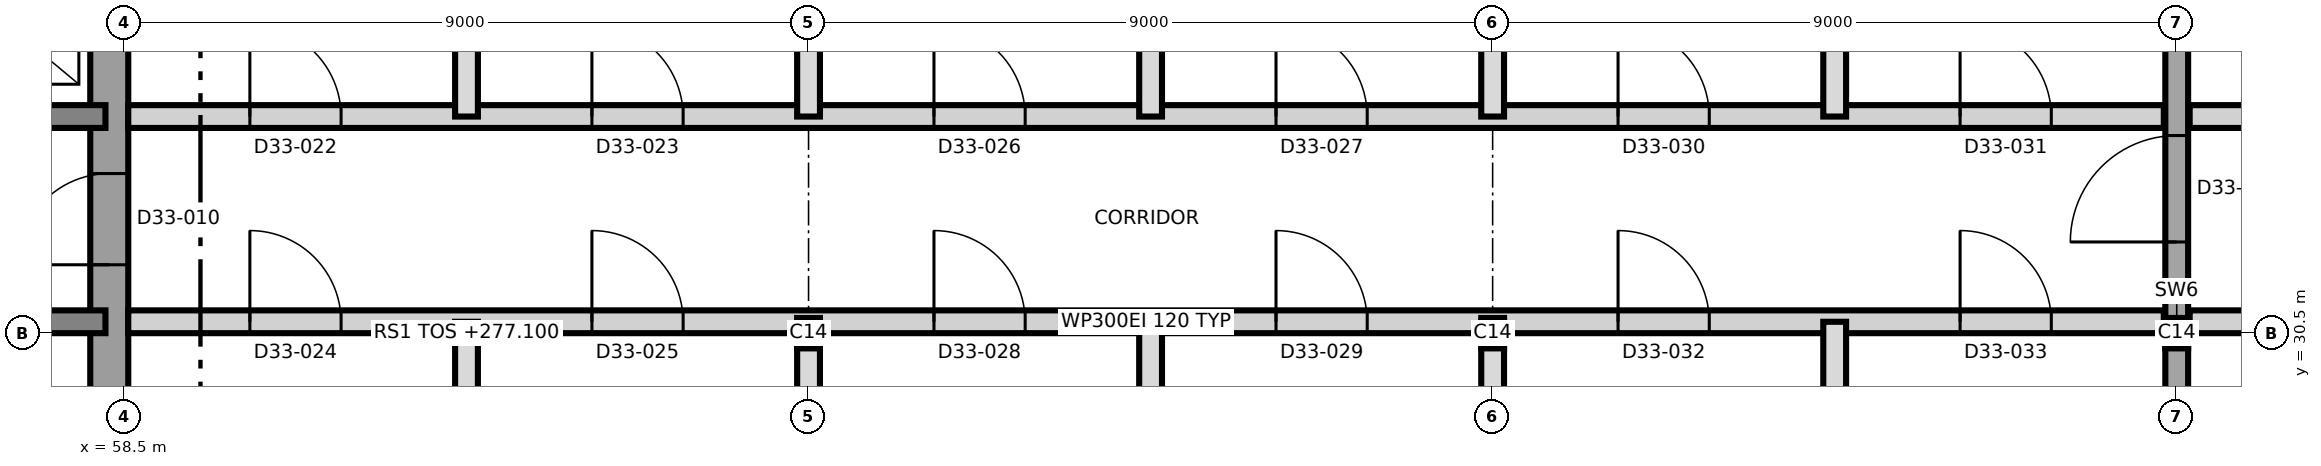
"""IFC4 building model, lengths in metres.
Left out: names, types, materials, properties, quantities, classifications, styles, units other than length and angle.
Written with IfcOpenShell. Run it as: python <this file> out.ifc"""

import sys

from ifc_helpers import new_model, si_unit, direction, frame, frame_2d, origin, origin_2d, place, context, subcontext, project, spatial, rectangle, i_section, extrude, element, fill, save


model = new_model("IFC4")
c1 = context("Model", 3, precision=1e-05, world=origin(), true_north=direction((0.0, 1.0)))
c2 = subcontext(c1, "Body", "Model", "MODEL_VIEW")
j1 = project(units=[si_unit("LENGTHUNIT", "METRE"), si_unit("PLANEANGLEUNIT", "RADIAN")], contexts=[c1])
p1 = place(None, origin())
s1 = spatial("IfcSite", under=j1, at=p1, CompositionType="ELEMENT")
p2 = place(p1, origin())
s2 = spatial("IfcBuilding", under=s1, at=p2, CompositionType="ELEMENT")
p3 = place(p2, frame((0.0, 0.0, 277.1)))
s3 = spatial("IfcBuildingStorey", under=s2, at=p3, CompositionType="ELEMENT", Elevation=277.1)
p4 = place(p3, frame((58.3, 21.25, 0.0), z_axis=(0.0, 0.0, 1.0), x_axis=(0.0, 1.0, 0.0)))
e1 = element("IfcWall", 1, at=p4, inside=s3, PredefinedType="SHEAR", context=c2, shape_type="SweptSolid", body=[
    extrude(rectangle(XDim=18.5, YDim=0.5, at=frame_2d((9.25, 0.0))), origin(), (0.0, 0.0, 1.0), 4.2),
])
p5 = place(p4, frame((10.15, 0.0, 0.0)))
e2 = element("IfcOpeningElement", 2, at=p5, cuts=e1, PredefinedType="OPENING", context=c2, shape_type="SweptSolid", body=[
    extrude(rectangle(XDim=1.2, YDim=2.1, at=frame_2d((0.6, 1.05))), frame((0.0, 0.26, 0.0), z_axis=(0.0, -1.0, 0.0), x_axis=(1.0, 0.0, 0.0)), (0.0, 0.0, 1.0), 0.52),
])
p6 = place(p3, frame((31.75, 30.65, 0.0), z_axis=(0.0, 0.0, 1.0), x_axis=(1.0, 0.0, 0.0)))
e3 = element("IfcWall", 3, at=p6, inside=s3, PredefinedType="SHEAR", context=c2, shape_type="SweptSolid", body=[
    extrude(rectangle(XDim=26.5, YDim=0.3, at=frame_2d((13.25, 0.0))), origin(), (0.0, 0.0, 1.0), 4.2),
])
p7 = place(p6, frame((24.75, 0.0, 0.0)))
e4 = element("IfcOpeningElement", 4, at=p7, cuts=e3, PredefinedType="OPENING", context=c2, shape_type="SweptSolid", body=[
    extrude(rectangle(XDim=1.0, YDim=2.1, at=frame_2d((0.5, 1.05))), frame((0.0, 0.16, 0.0), z_axis=(0.0, -1.0, 0.0), x_axis=(1.0, 0.0, 0.0)), (0.0, 0.0, 1.0), 0.32),
])
p8 = place(p6, frame((11.55, 0.0, 0.0)))
e5 = element("IfcOpeningElement", 5, at=p8, cuts=e3, PredefinedType="OPENING", context=c2, shape_type="SweptSolid", body=[
    extrude(rectangle(XDim=1.0, YDim=2.1, at=frame_2d((0.5, 1.05))), frame((0.0, 0.16, 0.0), z_axis=(0.0, -1.0, 0.0), x_axis=(1.0, 0.0, 0.0)), (0.0, 0.0, 1.0), 0.32),
])
p9 = place(p3, frame((31.75, 33.35, 0.0), z_axis=(0.0, 0.0, 1.0), x_axis=(1.0, 0.0, 0.0)))
e6 = element("IfcWall", 6, at=p9, inside=s3, PredefinedType="SHEAR", context=c2, shape_type="SweptSolid", body=[
    extrude(rectangle(XDim=26.5, YDim=0.3, at=frame_2d((13.25, 0.0))), origin(), (0.0, 0.0, 1.0), 4.2),
])
p10 = place(p9, frame((13.9, 0.0, 0.0)))
e7 = element("IfcOpeningElement", 7, at=p10, cuts=e6, PredefinedType="OPENING", context=c2, shape_type="SweptSolid", body=[
    extrude(rectangle(XDim=1.4, YDim=2.1, at=frame_2d((0.7, 1.05))), frame((0.0, 0.16, 0.0), z_axis=(0.0, -1.0, 0.0), x_axis=(1.0, 0.0, 0.0)), (0.0, 0.0, 1.0), 0.32),
])
p11 = place(p9, frame((5.375, 0.0, 0.0)))
e8 = element("IfcOpeningElement", 8, at=p11, cuts=e6, PredefinedType="OPENING", context=c2, shape_type="SweptSolid", body=[
    extrude(rectangle(XDim=1.2, YDim=2.1, at=frame_2d((0.6, 1.05))), frame((0.0, 0.16, 0.0), z_axis=(0.0, -1.0, 0.0), x_axis=(1.0, 0.0, 0.0)), (0.0, 0.0, 1.0), 0.32),
])
p12 = place(p9, frame((19.925, 0.0, 0.0)))
e9 = element("IfcOpeningElement", 9, at=p12, cuts=e6, PredefinedType="OPENING", context=c2, shape_type="SweptSolid", body=[
    extrude(rectangle(XDim=1.2, YDim=2.1, at=frame_2d((0.6, 1.05))), frame((0.0, 0.16, 0.0), z_axis=(0.0, -1.0, 0.0), x_axis=(1.0, 0.0, 0.0)), (0.0, 0.0, 1.0), 0.32),
])
p13 = place(p9, frame((9.8, 0.0, 0.0)))
e10 = element("IfcOpeningElement", 10, at=p13, cuts=e6, PredefinedType="OPENING", context=c2, shape_type="SweptSolid", body=[
    extrude(rectangle(XDim=0.9, YDim=2.1, at=frame_2d((0.45, 1.05))), frame((0.0, 0.16, 0.0), z_axis=(0.0, -1.0, 0.0), x_axis=(1.0, 0.0, 0.0)), (0.0, 0.0, 1.0), 0.32),
])
p14 = place(p3, frame((85.5, 20.35, 0.0), z_axis=(0.0, 0.0, 1.0), x_axis=(0.0, 1.0, 0.0)))
e11 = element("IfcWall", 11, at=p14, inside=s3, PredefinedType="SHEAR", context=c2, shape_type="SweptSolid", body=[
    extrude(rectangle(XDim=20.3, YDim=0.3, at=frame_2d((10.15, 0.0))), origin(), (0.0, 0.0, 1.0), 4.2),
])
p15 = place(p14, frame((11.35, 0.0, 0.0)))
e12 = element("IfcOpeningElement", 12, at=p15, cuts=e11, PredefinedType="OPENING", context=c2, shape_type="SweptSolid", body=[
    extrude(rectangle(XDim=1.4, YDim=2.1, at=frame_2d((0.7, 1.05))), frame((0.0, 0.16, 0.0), z_axis=(0.0, -1.0, 0.0), x_axis=(1.0, 0.0, 0.0)), (0.0, 0.0, 1.0), 0.32),
])
for number, where, z_axis, x_axis in (
    (13, (67.5, 30.5, 0.0), (0.0, 0.0, 1.0), (1.0, 0.0, 0.0)),
    (14, (76.5, 30.5, 0.0), (0.0, 0.0, 1.0), (1.0, 0.0, 0.0)),
    (15, (85.5, 30.5, 0.0), (0.0, 0.0, 1.0), (1.0, 0.0, 0.0)),
):
    element("IfcColumn", number, at=place(p3, frame(where, z_axis=z_axis, x_axis=x_axis)), inside=s3, PredefinedType="COLUMN", context=c2, shape_type="SweptSolid", body=[
        extrude(i_section(OverallWidth=0.3, OverallDepth=0.4, WebThickness=0.013, FlangeThickness=0.024, FilletRadius=0.027, at=origin_2d()), origin(), (0.0, 0.0, 1.0), 4.2),
    ])
p16 = place(p3, frame((58.55, 30.65, 0.0), z_axis=(0.0, 0.0, 1.0), x_axis=(1.0, 0.0, 0.0)))
e16 = element("IfcWall", 16, at=p16, inside=s3, PredefinedType="PARTITIONING", context=c2, shape_type="SweptSolid", body=[
    extrude(rectangle(XDim=26.78, YDim=0.3, at=frame_2d((13.39, 0.0))), origin(), (0.0, 0.0, 1.0), 3.9),
])
p17 = place(p16, frame((1.6, 0.0, 0.0)))
e17 = element("IfcOpeningElement", 17, at=p17, cuts=e16, PredefinedType="OPENING", context=c2, shape_type="SweptSolid", body=[
    extrude(rectangle(XDim=1.2, YDim=2.1, at=frame_2d((0.6, 1.05))), frame((0.0, 0.16, 0.0), z_axis=(0.0, -1.0, 0.0), x_axis=(1.0, 0.0, 0.0)), (0.0, 0.0, 1.0), 0.32),
])
p18 = place(p16, frame((6.1, 0.0, 0.0)))
e18 = element("IfcOpeningElement", 18, at=p18, cuts=e16, PredefinedType="OPENING", context=c2, shape_type="SweptSolid", body=[
    extrude(rectangle(XDim=1.2, YDim=2.1, at=frame_2d((0.6, 1.05))), frame((0.0, 0.16, 0.0), z_axis=(0.0, -1.0, 0.0), x_axis=(1.0, 0.0, 0.0)), (0.0, 0.0, 1.0), 0.32),
])
p19 = place(p16, frame((10.6, 0.0, 0.0)))
e19 = element("IfcOpeningElement", 19, at=p19, cuts=e16, PredefinedType="OPENING", context=c2, shape_type="SweptSolid", body=[
    extrude(rectangle(XDim=1.2, YDim=2.1, at=frame_2d((0.6, 1.05))), frame((0.0, 0.16, 0.0), z_axis=(0.0, -1.0, 0.0), x_axis=(1.0, 0.0, 0.0)), (0.0, 0.0, 1.0), 0.32),
])
p20 = place(p16, frame((15.1, 0.0, 0.0)))
e20 = element("IfcOpeningElement", 20, at=p20, cuts=e16, PredefinedType="OPENING", context=c2, shape_type="SweptSolid", body=[
    extrude(rectangle(XDim=1.2, YDim=2.1, at=frame_2d((0.6, 1.05))), frame((0.0, 0.16, 0.0), z_axis=(0.0, -1.0, 0.0), x_axis=(1.0, 0.0, 0.0)), (0.0, 0.0, 1.0), 0.32),
])
p21 = place(p16, frame((19.6, 0.0, 0.0)))
e21 = element("IfcOpeningElement", 21, at=p21, cuts=e16, PredefinedType="OPENING", context=c2, shape_type="SweptSolid", body=[
    extrude(rectangle(XDim=1.2, YDim=2.1, at=frame_2d((0.6, 1.05))), frame((0.0, 0.16, 0.0), z_axis=(0.0, -1.0, 0.0), x_axis=(1.0, 0.0, 0.0)), (0.0, 0.0, 1.0), 0.32),
])
p22 = place(p16, frame((24.1, 0.0, 0.0)))
e22 = element("IfcOpeningElement", 22, at=p22, cuts=e16, PredefinedType="OPENING", context=c2, shape_type="SweptSolid", body=[
    extrude(rectangle(XDim=1.2, YDim=2.1, at=frame_2d((0.6, 1.05))), frame((0.0, 0.16, 0.0), z_axis=(0.0, -1.0, 0.0), x_axis=(1.0, 0.0, 0.0)), (0.0, 0.0, 1.0), 0.32),
])
p23 = place(p3, frame((85.67, 30.65, 0.0), z_axis=(0.0, 0.0, 1.0), x_axis=(1.0, 0.0, 0.0)))
e23 = element("IfcWall", 23, at=p23, inside=s3, PredefinedType="PARTITIONING", context=c2, shape_type="SweptSolid", body=[
    extrude(rectangle(XDim=9.58, YDim=0.3, at=frame_2d((4.79, 0.0))), origin(), (0.0, 0.0, 1.0), 3.9),
])
p24 = place(p23, frame((2.23, 0.0, 0.0)))
e24 = element("IfcOpeningElement", 24, at=p24, cuts=e23, PredefinedType="OPENING", context=c2, shape_type="SweptSolid", body=[
    extrude(rectangle(XDim=0.9, YDim=2.1, at=frame_2d((0.45, 1.05))), frame((0.0, 0.16, 0.0), z_axis=(0.0, -1.0, 0.0), x_axis=(1.0, 0.0, 0.0)), (0.0, 0.0, 1.0), 0.32),
])
p25 = place(p23, frame((5.63, 0.0, 0.0)))
e25 = element("IfcOpeningElement", 25, at=p25, cuts=e23, PredefinedType="OPENING", context=c2, shape_type="SweptSolid", body=[
    extrude(rectangle(XDim=1.0, YDim=2.1, at=frame_2d((0.5, 1.05))), frame((0.0, 0.16, 0.0), z_axis=(0.0, -1.0, 0.0), x_axis=(1.0, 0.0, 0.0)), (0.0, 0.0, 1.0), 0.32),
])
p26 = place(p3, frame((58.55, 33.35, 0.0), z_axis=(0.0, 0.0, 1.0), x_axis=(1.0, 0.0, 0.0)))
e26 = element("IfcWall", 26, at=p26, inside=s3, PredefinedType="PARTITIONING", context=c2, shape_type="SweptSolid", body=[
    extrude(rectangle(XDim=26.78, YDim=0.3, at=frame_2d((13.39, 0.0))), origin(), (0.0, 0.0, 1.0), 3.9),
])
p27 = place(p26, frame((1.6, 0.0, 0.0)))
e27 = element("IfcOpeningElement", 27, at=p27, cuts=e26, PredefinedType="OPENING", context=c2, shape_type="SweptSolid", body=[
    extrude(rectangle(XDim=1.2, YDim=2.1, at=frame_2d((0.6, 1.05))), frame((0.0, 0.16, 0.0), z_axis=(0.0, -1.0, 0.0), x_axis=(1.0, 0.0, 0.0)), (0.0, 0.0, 1.0), 0.32),
])
p28 = place(p26, frame((6.1, 0.0, 0.0)))
e28 = element("IfcOpeningElement", 28, at=p28, cuts=e26, PredefinedType="OPENING", context=c2, shape_type="SweptSolid", body=[
    extrude(rectangle(XDim=1.2, YDim=2.1, at=frame_2d((0.6, 1.05))), frame((0.0, 0.16, 0.0), z_axis=(0.0, -1.0, 0.0), x_axis=(1.0, 0.0, 0.0)), (0.0, 0.0, 1.0), 0.32),
])
p29 = place(p26, frame((10.6, 0.0, 0.0)))
e29 = element("IfcOpeningElement", 29, at=p29, cuts=e26, PredefinedType="OPENING", context=c2, shape_type="SweptSolid", body=[
    extrude(rectangle(XDim=1.2, YDim=2.1, at=frame_2d((0.6, 1.05))), frame((0.0, 0.16, 0.0), z_axis=(0.0, -1.0, 0.0), x_axis=(1.0, 0.0, 0.0)), (0.0, 0.0, 1.0), 0.32),
])
p30 = place(p26, frame((15.1, 0.0, 0.0)))
e30 = element("IfcOpeningElement", 30, at=p30, cuts=e26, PredefinedType="OPENING", context=c2, shape_type="SweptSolid", body=[
    extrude(rectangle(XDim=1.2, YDim=2.1, at=frame_2d((0.6, 1.05))), frame((0.0, 0.16, 0.0), z_axis=(0.0, -1.0, 0.0), x_axis=(1.0, 0.0, 0.0)), (0.0, 0.0, 1.0), 0.32),
])
p31 = place(p26, frame((19.6, 0.0, 0.0)))
e31 = element("IfcOpeningElement", 31, at=p31, cuts=e26, PredefinedType="OPENING", context=c2, shape_type="SweptSolid", body=[
    extrude(rectangle(XDim=1.2, YDim=2.1, at=frame_2d((0.6, 1.05))), frame((0.0, 0.16, 0.0), z_axis=(0.0, -1.0, 0.0), x_axis=(1.0, 0.0, 0.0)), (0.0, 0.0, 1.0), 0.32),
])
p32 = place(p26, frame((24.1, 0.0, 0.0)))
e32 = element("IfcOpeningElement", 32, at=p32, cuts=e26, PredefinedType="OPENING", context=c2, shape_type="SweptSolid", body=[
    extrude(rectangle(XDim=1.2, YDim=2.1, at=frame_2d((0.6, 1.05))), frame((0.0, 0.16, 0.0), z_axis=(0.0, -1.0, 0.0), x_axis=(1.0, 0.0, 0.0)), (0.0, 0.0, 1.0), 0.32),
])
p33 = place(p3, frame((85.67, 33.35, 0.0), z_axis=(0.0, 0.0, 1.0), x_axis=(1.0, 0.0, 0.0)))
e33 = element("IfcWall", 33, at=p33, inside=s3, PredefinedType="PARTITIONING", context=c2, shape_type="SweptSolid", body=[
    extrude(rectangle(XDim=9.58, YDim=0.3, at=frame_2d((4.79, 0.0))), origin(), (0.0, 0.0, 1.0), 3.9),
])
p34 = place(p33, frame((1.83, 0.0, 0.0)))
e34 = element("IfcOpeningElement", 34, at=p34, cuts=e33, PredefinedType="OPENING", context=c2, shape_type="SweptSolid", body=[
    extrude(rectangle(XDim=1.0, YDim=2.1, at=frame_2d((0.5, 1.05))), frame((0.0, 0.16, 0.0), z_axis=(0.0, -1.0, 0.0), x_axis=(1.0, 0.0, 0.0)), (0.0, 0.0, 1.0), 0.32),
])
p35 = place(p33, frame((5.63, 0.0, 0.0)))
e35 = element("IfcOpeningElement", 35, at=p35, cuts=e33, PredefinedType="OPENING", context=c2, shape_type="SweptSolid", body=[
    extrude(rectangle(XDim=1.0, YDim=2.1, at=frame_2d((0.5, 1.05))), frame((0.0, 0.16, 0.0), z_axis=(0.0, -1.0, 0.0), x_axis=(1.0, 0.0, 0.0)), (0.0, 0.0, 1.0), 0.32),
])
p36 = place(p3, frame((63.0, 20.17, 0.0), z_axis=(0.0, 0.0, 1.0), x_axis=(0.0, 1.0, 0.0)))
e36 = element("IfcWall", 36, at=p36, inside=s3, PredefinedType="PARTITIONING", context=c2, shape_type="SweptSolid", body=[
    extrude(rectangle(XDim=10.48, YDim=0.3, at=frame_2d((5.24, 0.0))), origin(), (0.0, 0.0, 1.0), 3.9),
])
p37 = place(p3, frame((63.0, 33.35, 0.0), z_axis=(0.0, 0.0, 1.0), x_axis=(0.0, 1.0, 0.0)))
e37 = element("IfcWall", 37, at=p37, inside=s3, PredefinedType="PARTITIONING", context=c2, shape_type="SweptSolid", body=[
    extrude(rectangle(XDim=7.48, YDim=0.3, at=frame_2d((3.74, 0.0))), origin(), (0.0, 0.0, 1.0), 3.9),
])
p38 = place(p3, frame((67.5, 20.17, 0.0), z_axis=(0.0, 0.0, 1.0), x_axis=(0.0, 1.0, 0.0)))
e38 = element("IfcWall", 38, at=p38, inside=s3, PredefinedType="PARTITIONING", context=c2, shape_type="SweptSolid", body=[
    extrude(rectangle(XDim=10.48, YDim=0.3, at=frame_2d((5.24, 0.0))), origin(), (0.0, 0.0, 1.0), 3.9),
])
p39 = place(p3, frame((67.5, 33.35, 0.0), z_axis=(0.0, 0.0, 1.0), x_axis=(0.0, 1.0, 0.0)))
e39 = element("IfcWall", 39, at=p39, inside=s3, PredefinedType="PARTITIONING", context=c2, shape_type="SweptSolid", body=[
    extrude(rectangle(XDim=7.48, YDim=0.3, at=frame_2d((3.74, 0.0))), origin(), (0.0, 0.0, 1.0), 3.9),
])
p40 = place(p3, frame((72.0, 20.17, 0.0), z_axis=(0.0, 0.0, 1.0), x_axis=(0.0, 1.0, 0.0)))
e40 = element("IfcWall", 40, at=p40, inside=s3, PredefinedType="PARTITIONING", context=c2, shape_type="SweptSolid", body=[
    extrude(rectangle(XDim=10.48, YDim=0.3, at=frame_2d((5.24, 0.0))), origin(), (0.0, 0.0, 1.0), 3.9),
])
p41 = place(p3, frame((72.0, 33.35, 0.0), z_axis=(0.0, 0.0, 1.0), x_axis=(0.0, 1.0, 0.0)))
e41 = element("IfcWall", 41, at=p41, inside=s3, PredefinedType="PARTITIONING", context=c2, shape_type="SweptSolid", body=[
    extrude(rectangle(XDim=7.48, YDim=0.3, at=frame_2d((3.74, 0.0))), origin(), (0.0, 0.0, 1.0), 3.9),
])
p42 = place(p3, frame((76.5, 20.17, 0.0), z_axis=(0.0, 0.0, 1.0), x_axis=(0.0, 1.0, 0.0)))
e42 = element("IfcWall", 42, at=p42, inside=s3, PredefinedType="PARTITIONING", context=c2, shape_type="SweptSolid", body=[
    extrude(rectangle(XDim=10.48, YDim=0.3, at=frame_2d((5.24, 0.0))), origin(), (0.0, 0.0, 1.0), 3.9),
])
p43 = place(p3, frame((76.5, 33.35, 0.0), z_axis=(0.0, 0.0, 1.0), x_axis=(0.0, 1.0, 0.0)))
e43 = element("IfcWall", 43, at=p43, inside=s3, PredefinedType="PARTITIONING", context=c2, shape_type="SweptSolid", body=[
    extrude(rectangle(XDim=7.48, YDim=0.3, at=frame_2d((3.74, 0.0))), origin(), (0.0, 0.0, 1.0), 3.9),
])
p44 = place(p3, frame((81.0, 20.17, 0.0), z_axis=(0.0, 0.0, 1.0), x_axis=(0.0, 1.0, 0.0)))
e44 = element("IfcWall", 44, at=p44, inside=s3, PredefinedType="PARTITIONING", context=c2, shape_type="SweptSolid", body=[
    extrude(rectangle(XDim=10.48, YDim=0.3, at=frame_2d((5.24, 0.0))), origin(), (0.0, 0.0, 1.0), 3.9),
])
p45 = place(p3, frame((81.0, 33.35, 0.0), z_axis=(0.0, 0.0, 1.0), x_axis=(0.0, 1.0, 0.0)))
e45 = element("IfcWall", 45, at=p45, inside=s3, PredefinedType="PARTITIONING", context=c2, shape_type="SweptSolid", body=[
    extrude(rectangle(XDim=7.48, YDim=0.3, at=frame_2d((3.74, 0.0))), origin(), (0.0, 0.0, 1.0), 3.9),
])
p46 = place(p5, origin())
e46 = element("IfcDoor", 46, at=p46, inside=s3, OperationType="SINGLE_SWING_LEFT", PredefinedType="DOOR", context=c2, shape_type="SweptSolid", body=[
    extrude(rectangle(XDim=1.2, YDim=2.1, at=frame_2d((0.6, 1.05))), frame((0.0, 0.025, 0.0), z_axis=(0.0, -1.0, 0.0), x_axis=(1.0, 0.0, 0.0)), (0.0, 0.0, 1.0), 0.05),
])
fill(e2, e46)
p47 = place(p27, origin())
e47 = element("IfcDoor", 47, at=p47, inside=s3, OperationType="SINGLE_SWING_LEFT", PredefinedType="DOOR", context=c2, shape_type="SweptSolid", body=[
    extrude(rectangle(XDim=1.2, YDim=2.1, at=frame_2d((0.6, 1.05))), frame((0.0, 0.025, 0.0), z_axis=(0.0, -1.0, 0.0), x_axis=(1.0, 0.0, 0.0)), (0.0, 0.0, 1.0), 0.05),
])
fill(e27, e47)
p48 = place(p28, origin())
e48 = element("IfcDoor", 48, at=p48, inside=s3, OperationType="SINGLE_SWING_LEFT", PredefinedType="DOOR", context=c2, shape_type="SweptSolid", body=[
    extrude(rectangle(XDim=1.2, YDim=2.1, at=frame_2d((0.6, 1.05))), frame((0.0, 0.025, 0.0), z_axis=(0.0, -1.0, 0.0), x_axis=(1.0, 0.0, 0.0)), (0.0, 0.0, 1.0), 0.05),
])
fill(e28, e48)
p49 = place(p17, origin())
e49 = element("IfcDoor", 49, at=p49, inside=s3, OperationType="SINGLE_SWING_RIGHT", PredefinedType="DOOR", context=c2, shape_type="SweptSolid", body=[
    extrude(rectangle(XDim=1.2, YDim=2.1, at=frame_2d((0.6, 1.05))), frame((0.0, 0.025, 0.0), z_axis=(0.0, -1.0, 0.0), x_axis=(1.0, 0.0, 0.0)), (0.0, 0.0, 1.0), 0.05),
])
fill(e17, e49)
p50 = place(p18, origin())
e50 = element("IfcDoor", 50, at=p50, inside=s3, OperationType="SINGLE_SWING_LEFT", PredefinedType="DOOR", context=c2, shape_type="SweptSolid", body=[
    extrude(rectangle(XDim=1.2, YDim=2.1, at=frame_2d((0.6, 1.05))), frame((0.0, 0.025, 0.0), z_axis=(0.0, -1.0, 0.0), x_axis=(1.0, 0.0, 0.0)), (0.0, 0.0, 1.0), 0.05),
])
fill(e18, e50)
p51 = place(p29, origin())
e51 = element("IfcDoor", 51, at=p51, inside=s3, OperationType="SINGLE_SWING_LEFT", PredefinedType="DOOR", context=c2, shape_type="SweptSolid", body=[
    extrude(rectangle(XDim=1.2, YDim=2.1, at=frame_2d((0.6, 1.05))), frame((0.0, 0.025, 0.0), z_axis=(0.0, -1.0, 0.0), x_axis=(1.0, 0.0, 0.0)), (0.0, 0.0, 1.0), 0.05),
])
fill(e29, e51)
p52 = place(p30, origin())
e52 = element("IfcDoor", 52, at=p52, inside=s3, OperationType="SINGLE_SWING_RIGHT", PredefinedType="DOOR", context=c2, shape_type="SweptSolid", body=[
    extrude(rectangle(XDim=1.2, YDim=2.1, at=frame_2d((0.6, 1.05))), frame((0.0, 0.025, 0.0), z_axis=(0.0, -1.0, 0.0), x_axis=(1.0, 0.0, 0.0)), (0.0, 0.0, 1.0), 0.05),
])
fill(e30, e52)
p53 = place(p19, origin())
e53 = element("IfcDoor", 53, at=p53, inside=s3, OperationType="SINGLE_SWING_LEFT", PredefinedType="DOOR", context=c2, shape_type="SweptSolid", body=[
    extrude(rectangle(XDim=1.2, YDim=2.1, at=frame_2d((0.6, 1.05))), frame((0.0, 0.025, 0.0), z_axis=(0.0, -1.0, 0.0), x_axis=(1.0, 0.0, 0.0)), (0.0, 0.0, 1.0), 0.05),
])
fill(e19, e53)
p54 = place(p20, origin())
e54 = element("IfcDoor", 54, at=p54, inside=s3, OperationType="SINGLE_SWING_LEFT", PredefinedType="DOOR", context=c2, shape_type="SweptSolid", body=[
    extrude(rectangle(XDim=1.2, YDim=2.1, at=frame_2d((0.6, 1.05))), frame((0.0, 0.025, 0.0), z_axis=(0.0, -1.0, 0.0), x_axis=(1.0, 0.0, 0.0)), (0.0, 0.0, 1.0), 0.05),
])
fill(e20, e54)
p55 = place(p31, origin())
e55 = element("IfcDoor", 55, at=p55, inside=s3, OperationType="SINGLE_SWING_RIGHT", PredefinedType="DOOR", context=c2, shape_type="SweptSolid", body=[
    extrude(rectangle(XDim=1.2, YDim=2.1, at=frame_2d((0.6, 1.05))), frame((0.0, 0.025, 0.0), z_axis=(0.0, -1.0, 0.0), x_axis=(1.0, 0.0, 0.0)), (0.0, 0.0, 1.0), 0.05),
])
fill(e31, e55)
p56 = place(p32, origin())
e56 = element("IfcDoor", 56, at=p56, inside=s3, OperationType="SINGLE_SWING_LEFT", PredefinedType="DOOR", context=c2, shape_type="SweptSolid", body=[
    extrude(rectangle(XDim=1.2, YDim=2.1, at=frame_2d((0.6, 1.05))), frame((0.0, 0.025, 0.0), z_axis=(0.0, -1.0, 0.0), x_axis=(1.0, 0.0, 0.0)), (0.0, 0.0, 1.0), 0.05),
])
fill(e32, e56)
p57 = place(p21, origin())
e57 = element("IfcDoor", 57, at=p57, inside=s3, OperationType="SINGLE_SWING_LEFT", PredefinedType="DOOR", context=c2, shape_type="SweptSolid", body=[
    extrude(rectangle(XDim=1.2, YDim=2.1, at=frame_2d((0.6, 1.05))), frame((0.0, 0.025, 0.0), z_axis=(0.0, -1.0, 0.0), x_axis=(1.0, 0.0, 0.0)), (0.0, 0.0, 1.0), 0.05),
])
fill(e21, e57)
p58 = place(p22, origin())
e58 = element("IfcDoor", 58, at=p58, inside=s3, OperationType="SINGLE_SWING_RIGHT", PredefinedType="DOOR", context=c2, shape_type="SweptSolid", body=[
    extrude(rectangle(XDim=1.2, YDim=2.1, at=frame_2d((0.6, 1.05))), frame((0.0, 0.025, 0.0), z_axis=(0.0, -1.0, 0.0), x_axis=(1.0, 0.0, 0.0)), (0.0, 0.0, 1.0), 0.05),
])
fill(e22, e58)
p59 = place(p15, origin())
e59 = element("IfcDoor", 59, at=p59, inside=s3, OperationType="SINGLE_SWING_RIGHT", PredefinedType="DOOR", context=c2, shape_type="SweptSolid", body=[
    extrude(rectangle(XDim=1.4, YDim=2.1, at=frame_2d((0.7, 1.05))), frame((0.0, 0.025, 0.0), z_axis=(0.0, -1.0, 0.0), x_axis=(1.0, 0.0, 0.0)), (0.0, 0.0, 1.0), 0.05),
])
fill(e12, e59)
save(model, sys.argv[1])
